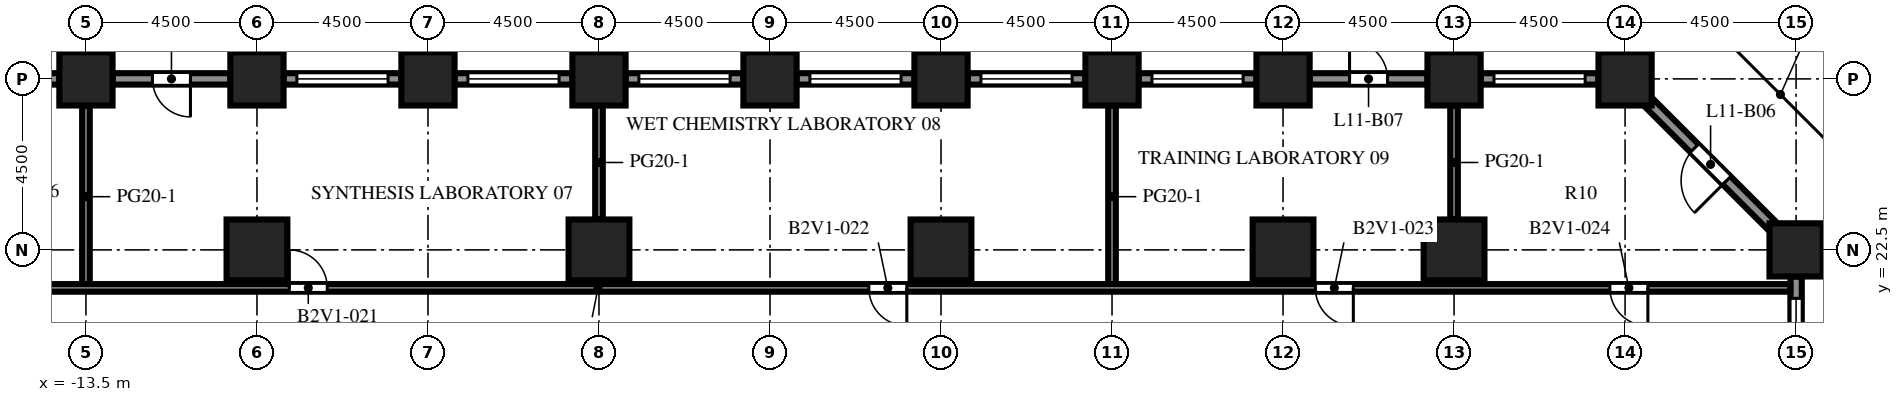
"""IFC4 building model, lengths in metres.
Left out: names, types, materials, properties, quantities, classifications, styles, units other than length and angle.
Written with IfcOpenShell. Run it as: python <this file> out.ifc"""

import sys

from ifc_helpers import new_model, si_unit, direction, frame, frame_2d, origin, origin_2d, place, context, subcontext, project, spatial, rectangle, extrude, element, fill, save


model = new_model("IFC4")
c1 = context("Model", 3, precision=1e-05, world=origin(), true_north=direction((0.0, 1.0)))
c2 = subcontext(c1, "Body", "Model", "MODEL_VIEW")
j1 = project(units=[si_unit("LENGTHUNIT", "METRE"), si_unit("PLANEANGLEUNIT", "RADIAN")], contexts=[c1])
p1 = place(None, origin())
s1 = spatial("IfcSite", under=j1, at=p1, CompositionType="ELEMENT")
p2 = place(p1, origin())
s2 = spatial("IfcBuilding", under=s1, at=p2, CompositionType="ELEMENT")
p3 = place(p2, frame((0.0, 0.0, 50.1)))
s3 = spatial("IfcBuildingStorey", under=s2, at=p3, CompositionType="ELEMENT", Elevation=50.1)
for number, where, z_axis, x_axis in (
    (1, (-13.5, 27.0, 0.0), (0.0, 0.0, 1.0), (1.0, 0.0, 0.0)),
    (2, (-9.0, 27.0, 0.0), (0.0, 0.0, 1.0), (1.0, 0.0, 0.0)),
    (3, (-4.5, 27.0, 0.0), (0.0, 0.0, 1.0), (1.0, 0.0, 0.0)),
    (4, (0.0, 27.0, 0.0), (0.0, 0.0, 1.0), (1.0, 0.0, 0.0)),
    (5, (4.5, 27.0, 0.0), (0.0, 0.0, 1.0), (1.0, 0.0, 0.0)),
    (6, (9.0, 27.0, 0.0), (0.0, 0.0, 1.0), (1.0, 0.0, 0.0)),
    (7, (13.5, 27.0, 0.0), (0.0, 0.0, 1.0), (1.0, 0.0, 0.0)),
    (8, (18.0, 27.0, 0.0), (0.0, 0.0, 1.0), (1.0, 0.0, 0.0)),
    (9, (22.5, 27.0, 0.0), (0.0, 0.0, 1.0), (1.0, 0.0, 0.0)),
    (10, (27.0, 27.0, 0.0), (0.0, 0.0, 1.0), (1.0, 0.0, 0.0)),
    (11, (31.5, 22.5, 0.0), (0.0, 0.0, 1.0), (1.0, 0.0, 0.0)),
):
    element("IfcColumn", number, at=place(p3, frame(where, z_axis=z_axis, x_axis=x_axis)), inside=s3, PredefinedType="COLUMN", context=c2, shape_type="SweptSolid", body=[
        extrude(rectangle(XDim=1.4, YDim=1.4, at=origin_2d()), origin(), (0.0, 0.0, 1.0), 4.1),
    ])
for number, where, z_axis, x_axis in (
    (12, (-9.0, 22.5, 0.0), (0.0, 0.0, 1.0), (1.0, 0.0, 0.0)),
    (13, (0.0, 22.5, 0.0), (0.0, 0.0, 1.0), (1.0, 0.0, 0.0)),
    (14, (9.0, 22.5, 0.0), (0.0, 0.0, 1.0), (1.0, 0.0, 0.0)),
    (15, (18.0, 22.5, 0.0), (0.0, 0.0, 1.0), (1.0, 0.0, 0.0)),
    (16, (22.5, 22.5, 0.0), (0.0, 0.0, 1.0), (1.0, 0.0, 0.0)),
):
    element("IfcColumn", number, at=place(p3, frame(where, z_axis=z_axis, x_axis=x_axis)), inside=s3, PredefinedType="COLUMN", context=c2, shape_type="SweptSolid", body=[
        extrude(rectangle(XDim=1.6, YDim=1.6, at=origin_2d()), origin(), (0.0, 0.0, 1.0), 4.1),
    ])
p4 = place(p3, frame((31.5, 21.8, 0.0), z_axis=(0.0, 0.0, 1.0), x_axis=(0.0, -1.0, 0.0)))
e17 = element("IfcWall", 17, at=p4, inside=s3, PredefinedType="SOLIDWALL", context=c2, shape_type="SweptSolid", body=[
    extrude(rectangle(XDim=3.1, YDim=0.3, at=frame_2d((1.55, 0.0))), origin(), (0.0, 0.0, 1.0), 2.75),
])
p5 = place(p4, frame((0.575, 0.0, 0.8)))
e18 = element("IfcOpeningElement", 18, at=p5, cuts=e17, PredefinedType="OPENING", context=c2, shape_type="SweptSolid", body=[
    extrude(rectangle(XDim=2.4, YDim=1.7, at=frame_2d((1.2, 0.85))), frame((0.0, 0.16, 0.0), z_axis=(0.0, -1.0, 0.0), x_axis=(1.0, 0.0, 0.0)), (0.0, 0.0, 1.0), 0.32),
])
p6 = place(p3, frame((27.594, 26.406, 0.0), z_axis=(0.0, 0.0, 1.0), x_axis=(0.707106781187, -0.707106781187, 0.0)))
e19 = element("IfcWall", 19, at=p6, inside=s3, PredefinedType="SOLIDWALL", context=c2, shape_type="SweptSolid", body=[
    extrude(rectangle(XDim=4.684, YDim=0.3, at=frame_2d((2.342, 0.0))), origin(), (0.0, 0.0, 1.0), 2.75),
])
p7 = place(p6, frame((1.742, 0.0, 0.0)))
e20 = element("IfcOpeningElement", 20, at=p7, cuts=e19, PredefinedType="OPENING", context=c2, shape_type="SweptSolid", body=[
    extrude(rectangle(XDim=1.2, YDim=2.2, at=frame_2d((0.6, 1.1))), frame((0.0, 0.16, 0.0), z_axis=(0.0, -1.0, 0.0), x_axis=(1.0, 0.0, 0.0)), (0.0, 0.0, 1.0), 0.32),
])
p8 = place(p3, frame((23.2, 27.0, 0.0), z_axis=(0.0, 0.0, 1.0), x_axis=(1.0, 0.0, 0.0)))
e21 = element("IfcWall", 21, at=p8, inside=s3, PredefinedType="SOLIDWALL", context=c2, shape_type="SweptSolid", body=[
    extrude(rectangle(XDim=3.1, YDim=0.3, at=frame_2d((1.55, 0.0))), origin(), (0.0, 0.0, 1.0), 2.75),
])
p9 = place(p8, frame((0.35, 0.0, 0.8)))
e22 = element("IfcOpeningElement", 22, at=p9, cuts=e21, PredefinedType="OPENING", context=c2, shape_type="SweptSolid", body=[
    extrude(rectangle(XDim=2.4, YDim=1.7, at=frame_2d((1.2, 0.85))), frame((0.0, 0.16, 0.0), z_axis=(0.0, -1.0, 0.0), x_axis=(1.0, 0.0, 0.0)), (0.0, 0.0, 1.0), 0.32),
])
p10 = place(p3, frame((18.7, 27.0, 0.0), z_axis=(0.0, 0.0, 1.0), x_axis=(1.0, 0.0, 0.0)))
e23 = element("IfcWall", 23, at=p10, inside=s3, PredefinedType="SOLIDWALL", context=c2, shape_type="SweptSolid", body=[
    extrude(rectangle(XDim=3.1, YDim=0.3, at=frame_2d((1.55, 0.0))), origin(), (0.0, 0.0, 1.0), 2.75),
])
p11 = place(p10, frame((1.05, 0.0, 0.0)))
e24 = element("IfcOpeningElement", 24, at=p11, cuts=e23, PredefinedType="OPENING", context=c2, shape_type="SweptSolid", body=[
    extrude(rectangle(XDim=1.0, YDim=2.2, at=frame_2d((0.5, 1.1))), frame((0.0, 0.16, 0.0), z_axis=(0.0, -1.0, 0.0), x_axis=(1.0, 0.0, 0.0)), (0.0, 0.0, 1.0), 0.32),
])
p12 = place(p3, frame((14.2, 27.0, 0.0), z_axis=(0.0, 0.0, 1.0), x_axis=(1.0, 0.0, 0.0)))
e25 = element("IfcWall", 25, at=p12, inside=s3, PredefinedType="SOLIDWALL", context=c2, shape_type="SweptSolid", body=[
    extrude(rectangle(XDim=3.1, YDim=0.3, at=frame_2d((1.55, 0.0))), origin(), (0.0, 0.0, 1.0), 2.75),
])
p13 = place(p12, frame((0.35, 0.0, 0.8)))
e26 = element("IfcOpeningElement", 26, at=p13, cuts=e25, PredefinedType="OPENING", context=c2, shape_type="SweptSolid", body=[
    extrude(rectangle(XDim=2.4, YDim=1.7, at=frame_2d((1.2, 0.85))), frame((0.0, 0.16, 0.0), z_axis=(0.0, -1.0, 0.0), x_axis=(1.0, 0.0, 0.0)), (0.0, 0.0, 1.0), 0.32),
])
p14 = place(p3, frame((9.7, 27.0, 0.0), z_axis=(0.0, 0.0, 1.0), x_axis=(1.0, 0.0, 0.0)))
e27 = element("IfcWall", 27, at=p14, inside=s3, PredefinedType="SOLIDWALL", context=c2, shape_type="SweptSolid", body=[
    extrude(rectangle(XDim=3.1, YDim=0.3, at=frame_2d((1.55, 0.0))), origin(), (0.0, 0.0, 1.0), 2.75),
])
p15 = place(p14, frame((0.35, 0.0, 0.8)))
e28 = element("IfcOpeningElement", 28, at=p15, cuts=e27, PredefinedType="OPENING", context=c2, shape_type="SweptSolid", body=[
    extrude(rectangle(XDim=2.4, YDim=1.7, at=frame_2d((1.2, 0.85))), frame((0.0, 0.16, 0.0), z_axis=(0.0, -1.0, 0.0), x_axis=(1.0, 0.0, 0.0)), (0.0, 0.0, 1.0), 0.32),
])
p16 = place(p3, frame((5.2, 27.0, 0.0), z_axis=(0.0, 0.0, 1.0), x_axis=(1.0, 0.0, 0.0)))
e29 = element("IfcWall", 29, at=p16, inside=s3, PredefinedType="SOLIDWALL", context=c2, shape_type="SweptSolid", body=[
    extrude(rectangle(XDim=3.1, YDim=0.3, at=frame_2d((1.55, 0.0))), origin(), (0.0, 0.0, 1.0), 2.75),
])
p17 = place(p16, frame((0.35, 0.0, 0.8)))
e30 = element("IfcOpeningElement", 30, at=p17, cuts=e29, PredefinedType="OPENING", context=c2, shape_type="SweptSolid", body=[
    extrude(rectangle(XDim=2.4, YDim=1.7, at=frame_2d((1.2, 0.85))), frame((0.0, 0.16, 0.0), z_axis=(0.0, -1.0, 0.0), x_axis=(1.0, 0.0, 0.0)), (0.0, 0.0, 1.0), 0.32),
])
p18 = place(p3, frame((0.7, 27.0, 0.0), z_axis=(0.0, 0.0, 1.0), x_axis=(1.0, 0.0, 0.0)))
e31 = element("IfcWall", 31, at=p18, inside=s3, PredefinedType="SOLIDWALL", context=c2, shape_type="SweptSolid", body=[
    extrude(rectangle(XDim=3.1, YDim=0.3, at=frame_2d((1.55, 0.0))), origin(), (0.0, 0.0, 1.0), 2.75),
])
p19 = place(p18, frame((0.35, 0.0, 0.8)))
e32 = element("IfcOpeningElement", 32, at=p19, cuts=e31, PredefinedType="OPENING", context=c2, shape_type="SweptSolid", body=[
    extrude(rectangle(XDim=2.4, YDim=1.7, at=frame_2d((1.2, 0.85))), frame((0.0, 0.16, 0.0), z_axis=(0.0, -1.0, 0.0), x_axis=(1.0, 0.0, 0.0)), (0.0, 0.0, 1.0), 0.32),
])
p20 = place(p3, frame((-3.8, 27.0, 0.0), z_axis=(0.0, 0.0, 1.0), x_axis=(1.0, 0.0, 0.0)))
e33 = element("IfcWall", 33, at=p20, inside=s3, PredefinedType="SOLIDWALL", context=c2, shape_type="SweptSolid", body=[
    extrude(rectangle(XDim=3.1, YDim=0.3, at=frame_2d((1.55, 0.0))), origin(), (0.0, 0.0, 1.0), 2.75),
])
p21 = place(p20, frame((0.35, 0.0, 0.8)))
e34 = element("IfcOpeningElement", 34, at=p21, cuts=e33, PredefinedType="OPENING", context=c2, shape_type="SweptSolid", body=[
    extrude(rectangle(XDim=2.4, YDim=1.7, at=frame_2d((1.2, 0.85))), frame((0.0, 0.16, 0.0), z_axis=(0.0, -1.0, 0.0), x_axis=(1.0, 0.0, 0.0)), (0.0, 0.0, 1.0), 0.32),
])
p22 = place(p3, frame((-8.3, 27.0, 0.0), z_axis=(0.0, 0.0, 1.0), x_axis=(1.0, 0.0, 0.0)))
e35 = element("IfcWall", 35, at=p22, inside=s3, PredefinedType="SOLIDWALL", context=c2, shape_type="SweptSolid", body=[
    extrude(rectangle(XDim=3.1, YDim=0.3, at=frame_2d((1.55, 0.0))), origin(), (0.0, 0.0, 1.0), 2.75),
])
p23 = place(p22, frame((0.35, 0.0, 0.8)))
e36 = element("IfcOpeningElement", 36, at=p23, cuts=e35, PredefinedType="OPENING", context=c2, shape_type="SweptSolid", body=[
    extrude(rectangle(XDim=2.4, YDim=1.7, at=frame_2d((1.2, 0.85))), frame((0.0, 0.16, 0.0), z_axis=(0.0, -1.0, 0.0), x_axis=(1.0, 0.0, 0.0)), (0.0, 0.0, 1.0), 0.32),
])
p24 = place(p3, frame((-12.8, 27.0, 0.0), z_axis=(0.0, 0.0, 1.0), x_axis=(1.0, 0.0, 0.0)))
e37 = element("IfcWall", 37, at=p24, inside=s3, PredefinedType="SOLIDWALL", context=c2, shape_type="SweptSolid", body=[
    extrude(rectangle(XDim=3.1, YDim=0.3, at=frame_2d((1.55, 0.0))), origin(), (0.0, 0.0, 1.0), 2.75),
])
p25 = place(p24, frame((1.05, 0.0, 0.0)))
e38 = element("IfcOpeningElement", 38, at=p25, cuts=e37, PredefinedType="OPENING", context=c2, shape_type="SweptSolid", body=[
    extrude(rectangle(XDim=1.0, YDim=2.2, at=frame_2d((0.5, 1.1))), frame((0.0, 0.16, 0.0), z_axis=(0.0, -1.0, 0.0), x_axis=(1.0, 0.0, 0.0)), (0.0, 0.0, 1.0), 0.32),
])
p26 = place(p3, frame((-17.3, 27.0, 0.0), z_axis=(0.0, 0.0, 1.0), x_axis=(1.0, 0.0, 0.0)))
e39 = element("IfcWall", 39, at=p26, inside=s3, PredefinedType="SOLIDWALL", context=c2, shape_type="SweptSolid", body=[
    extrude(rectangle(XDim=3.1, YDim=0.3, at=frame_2d((1.55, 0.0))), origin(), (0.0, 0.0, 1.0), 2.75),
])
p27 = place(p26, frame((0.35, 0.0, 0.8)))
e40 = element("IfcOpeningElement", 40, at=p27, cuts=e39, PredefinedType="OPENING", context=c2, shape_type="SweptSolid", body=[
    extrude(rectangle(XDim=2.4, YDim=1.7, at=frame_2d((1.2, 0.85))), frame((0.0, 0.16, 0.0), z_axis=(0.0, -1.0, 0.0), x_axis=(1.0, 0.0, 0.0)), (0.0, 0.0, 1.0), 0.32),
])
p28 = place(p3, frame((-13.5, 21.5, 0.0), z_axis=(0.0, 0.0, 1.0), x_axis=(0.0, 1.0, 0.0)))
e41 = element("IfcWall", 41, at=p28, inside=s3, PredefinedType="PARTITIONING", context=c2, shape_type="SweptSolid", body=[
    extrude(rectangle(XDim=4.8, YDim=0.2, at=frame_2d((2.4, 0.0))), origin(), (0.0, 0.0, 1.0), 3.65),
])
p29 = place(p3, frame((0.0, 23.3, 0.0), z_axis=(0.0, 0.0, 1.0), x_axis=(0.0, 1.0, 0.0)))
e42 = element("IfcWall", 42, at=p29, inside=s3, PredefinedType="PARTITIONING", context=c2, shape_type="SweptSolid", body=[
    extrude(rectangle(XDim=3.0, YDim=0.2, at=frame_2d((1.5, 0.0))), origin(), (0.0, 0.0, 1.0), 3.65),
])
p30 = place(p3, frame((13.5, 21.5, 0.0), z_axis=(0.0, 0.0, 1.0), x_axis=(0.0, 1.0, 0.0)))
e43 = element("IfcWall", 43, at=p30, inside=s3, PredefinedType="PARTITIONING", context=c2, shape_type="SweptSolid", body=[
    extrude(rectangle(XDim=4.8, YDim=0.2, at=frame_2d((2.4, 0.0))), origin(), (0.0, 0.0, 1.0), 3.65),
])
p31 = place(p3, frame((22.5, 23.3, 0.0), z_axis=(0.0, 0.0, 1.0), x_axis=(0.0, 1.0, 0.0)))
e44 = element("IfcWall", 44, at=p31, inside=s3, PredefinedType="PARTITIONING", context=c2, shape_type="SweptSolid", body=[
    extrude(rectangle(XDim=3.0, YDim=0.2, at=frame_2d((1.5, 0.0))), origin(), (0.0, 0.0, 1.0), 3.65),
])
p32 = place(p3, frame((-22.35, 21.5, 0.0), z_axis=(0.0, 0.0, 1.0), x_axis=(1.0, 0.0, 0.0)))
e45 = element("IfcWall", 45, at=p32, inside=s3, PredefinedType="PARTITIONING", context=c2, shape_type="SweptSolid", body=[
    extrude(rectangle(XDim=53.7, YDim=0.2, at=frame_2d((26.85, 0.0))), origin(), (0.0, 0.0, 1.0), 3.65),
])
p33 = place(p32, frame((3.7, 0.0, 0.0)))
e46 = element("IfcOpeningElement", 46, at=p33, cuts=e45, PredefinedType="OPENING", context=c2, shape_type="SweptSolid", body=[
    extrude(rectangle(XDim=1.0, YDim=2.1, at=frame_2d((0.5, 1.05))), frame((0.0, 0.11, 0.0), z_axis=(0.0, -1.0, 0.0), x_axis=(1.0, 0.0, 0.0)), (0.0, 0.0, 1.0), 0.22),
])
p34 = place(p32, frame((14.2, 0.0, 0.0)))
e47 = element("IfcOpeningElement", 47, at=p34, cuts=e45, PredefinedType="OPENING", context=c2, shape_type="SweptSolid", body=[
    extrude(rectangle(XDim=1.0, YDim=2.1, at=frame_2d((0.5, 1.05))), frame((0.0, 0.11, 0.0), z_axis=(0.0, -1.0, 0.0), x_axis=(1.0, 0.0, 0.0)), (0.0, 0.0, 1.0), 0.22),
])
p35 = place(p32, frame((29.45, 0.0, 0.0)))
e48 = element("IfcOpeningElement", 48, at=p35, cuts=e45, PredefinedType="OPENING", context=c2, shape_type="SweptSolid", body=[
    extrude(rectangle(XDim=1.0, YDim=2.1, at=frame_2d((0.5, 1.05))), frame((0.0, 0.11, 0.0), z_axis=(0.0, -1.0, 0.0), x_axis=(1.0, 0.0, 0.0)), (0.0, 0.0, 1.0), 0.22),
])
p36 = place(p32, frame((41.2, 0.0, 0.0)))
e49 = element("IfcOpeningElement", 49, at=p36, cuts=e45, PredefinedType="OPENING", context=c2, shape_type="SweptSolid", body=[
    extrude(rectangle(XDim=1.0, YDim=2.1, at=frame_2d((0.5, 1.05))), frame((0.0, 0.11, 0.0), z_axis=(0.0, -1.0, 0.0), x_axis=(1.0, 0.0, 0.0)), (0.0, 0.0, 1.0), 0.22),
])
p37 = place(p32, frame((48.95, 0.0, 0.0)))
e50 = element("IfcOpeningElement", 50, at=p37, cuts=e45, PredefinedType="OPENING", context=c2, shape_type="SweptSolid", body=[
    extrude(rectangle(XDim=1.0, YDim=2.1, at=frame_2d((0.5, 1.05))), frame((0.0, 0.11, 0.0), z_axis=(0.0, -1.0, 0.0), x_axis=(1.0, 0.0, 0.0)), (0.0, 0.0, 1.0), 0.22),
])
p38 = place(p5, origin())
e51 = element("IfcWindow", 51, at=p38, inside=s3, PartitioningType="SINGLE_PANEL", PredefinedType="WINDOW", context=c2, shape_type="SweptSolid", body=[
    extrude(rectangle(XDim=2.4, YDim=1.7, at=frame_2d((1.2, 0.85))), frame((0.0, 0.03, 0.0), z_axis=(0.0, -1.0, 0.0), x_axis=(1.0, 0.0, 0.0)), (0.0, 0.0, 1.0), 0.06),
])
fill(e18, e51)
p39 = place(p7, origin())
e52 = element("IfcDoor", 52, at=p39, inside=s3, OperationType="SINGLE_SWING_RIGHT", PredefinedType="DOOR", context=c2, shape_type="SweptSolid", body=[
    extrude(rectangle(XDim=1.2, YDim=2.2, at=frame_2d((0.6, 1.1))), frame((0.0, 0.025, 0.0), z_axis=(0.0, -1.0, 0.0), x_axis=(1.0, 0.0, 0.0)), (0.0, 0.0, 1.0), 0.05),
])
fill(e20, e52)
p40 = place(p9, origin())
e53 = element("IfcWindow", 53, at=p40, inside=s3, PartitioningType="SINGLE_PANEL", PredefinedType="WINDOW", context=c2, shape_type="SweptSolid", body=[
    extrude(rectangle(XDim=2.4, YDim=1.7, at=frame_2d((1.2, 0.85))), frame((0.0, 0.03, 0.0), z_axis=(0.0, -1.0, 0.0), x_axis=(1.0, 0.0, 0.0)), (0.0, 0.0, 1.0), 0.06),
])
fill(e22, e53)
p41 = place(p11, origin())
e54 = element("IfcDoor", 54, at=p41, inside=s3, OperationType="SINGLE_SWING_LEFT", PredefinedType="DOOR", context=c2, shape_type="SweptSolid", body=[
    extrude(rectangle(XDim=1.0, YDim=2.2, at=frame_2d((0.5, 1.1))), frame((0.0, 0.025, 0.0), z_axis=(0.0, -1.0, 0.0), x_axis=(1.0, 0.0, 0.0)), (0.0, 0.0, 1.0), 0.05),
])
fill(e24, e54)
p42 = place(p13, origin())
e55 = element("IfcWindow", 55, at=p42, inside=s3, PartitioningType="SINGLE_PANEL", PredefinedType="WINDOW", context=c2, shape_type="SweptSolid", body=[
    extrude(rectangle(XDim=2.4, YDim=1.7, at=frame_2d((1.2, 0.85))), frame((0.0, 0.03, 0.0), z_axis=(0.0, -1.0, 0.0), x_axis=(1.0, 0.0, 0.0)), (0.0, 0.0, 1.0), 0.06),
])
fill(e26, e55)
p43 = place(p15, origin())
e56 = element("IfcWindow", 56, at=p43, inside=s3, PartitioningType="SINGLE_PANEL", PredefinedType="WINDOW", context=c2, shape_type="SweptSolid", body=[
    extrude(rectangle(XDim=2.4, YDim=1.7, at=frame_2d((1.2, 0.85))), frame((0.0, 0.03, 0.0), z_axis=(0.0, -1.0, 0.0), x_axis=(1.0, 0.0, 0.0)), (0.0, 0.0, 1.0), 0.06),
])
fill(e28, e56)
p44 = place(p17, origin())
e57 = element("IfcWindow", 57, at=p44, inside=s3, PartitioningType="SINGLE_PANEL", PredefinedType="WINDOW", context=c2, shape_type="SweptSolid", body=[
    extrude(rectangle(XDim=2.4, YDim=1.7, at=frame_2d((1.2, 0.85))), frame((0.0, 0.03, 0.0), z_axis=(0.0, -1.0, 0.0), x_axis=(1.0, 0.0, 0.0)), (0.0, 0.0, 1.0), 0.06),
])
fill(e30, e57)
p45 = place(p19, origin())
e58 = element("IfcWindow", 58, at=p45, inside=s3, PartitioningType="SINGLE_PANEL", PredefinedType="WINDOW", context=c2, shape_type="SweptSolid", body=[
    extrude(rectangle(XDim=2.4, YDim=1.7, at=frame_2d((1.2, 0.85))), frame((0.0, 0.03, 0.0), z_axis=(0.0, -1.0, 0.0), x_axis=(1.0, 0.0, 0.0)), (0.0, 0.0, 1.0), 0.06),
])
fill(e32, e58)
p46 = place(p21, origin())
e59 = element("IfcWindow", 59, at=p46, inside=s3, PartitioningType="SINGLE_PANEL", PredefinedType="WINDOW", context=c2, shape_type="SweptSolid", body=[
    extrude(rectangle(XDim=2.4, YDim=1.7, at=frame_2d((1.2, 0.85))), frame((0.0, 0.03, 0.0), z_axis=(0.0, -1.0, 0.0), x_axis=(1.0, 0.0, 0.0)), (0.0, 0.0, 1.0), 0.06),
])
fill(e34, e59)
p47 = place(p23, origin())
e60 = element("IfcWindow", 60, at=p47, inside=s3, PartitioningType="SINGLE_PANEL", PredefinedType="WINDOW", context=c2, shape_type="SweptSolid", body=[
    extrude(rectangle(XDim=2.4, YDim=1.7, at=frame_2d((1.2, 0.85))), frame((0.0, 0.03, 0.0), z_axis=(0.0, -1.0, 0.0), x_axis=(1.0, 0.0, 0.0)), (0.0, 0.0, 1.0), 0.06),
])
fill(e36, e60)
p48 = place(p25, origin())
e61 = element("IfcDoor", 61, at=p48, inside=s3, OperationType="SINGLE_SWING_RIGHT", PredefinedType="DOOR", context=c2, shape_type="SweptSolid", body=[
    extrude(rectangle(XDim=1.0, YDim=2.2, at=frame_2d((0.5, 1.1))), frame((0.0, 0.025, 0.0), z_axis=(0.0, -1.0, 0.0), x_axis=(1.0, 0.0, 0.0)), (0.0, 0.0, 1.0), 0.05),
])
fill(e38, e61)
p49 = place(p34, origin())
e62 = element("IfcDoor", 62, at=p49, inside=s3, OperationType="SINGLE_SWING_LEFT", PredefinedType="DOOR", context=c2, shape_type="SweptSolid", body=[
    extrude(rectangle(XDim=1.0, YDim=2.1, at=frame_2d((0.5, 1.05))), frame((0.0, 0.025, 0.0), z_axis=(0.0, -1.0, 0.0), x_axis=(1.0, 0.0, 0.0)), (0.0, 0.0, 1.0), 0.05),
])
fill(e47, e62)
p50 = place(p35, origin())
e63 = element("IfcDoor", 63, at=p50, inside=s3, OperationType="SINGLE_SWING_RIGHT", PredefinedType="DOOR", context=c2, shape_type="SweptSolid", body=[
    extrude(rectangle(XDim=1.0, YDim=2.1, at=frame_2d((0.5, 1.05))), frame((0.0, 0.025, 0.0), z_axis=(0.0, -1.0, 0.0), x_axis=(1.0, 0.0, 0.0)), (0.0, 0.0, 1.0), 0.05),
])
fill(e48, e63)
p51 = place(p36, origin())
e64 = element("IfcDoor", 64, at=p51, inside=s3, OperationType="SINGLE_SWING_RIGHT", PredefinedType="DOOR", context=c2, shape_type="SweptSolid", body=[
    extrude(rectangle(XDim=1.0, YDim=2.1, at=frame_2d((0.5, 1.05))), frame((0.0, 0.025, 0.0), z_axis=(0.0, -1.0, 0.0), x_axis=(1.0, 0.0, 0.0)), (0.0, 0.0, 1.0), 0.05),
])
fill(e49, e64)
p52 = place(p37, origin())
e65 = element("IfcDoor", 65, at=p52, inside=s3, OperationType="SINGLE_SWING_RIGHT", PredefinedType="DOOR", context=c2, shape_type="SweptSolid", body=[
    extrude(rectangle(XDim=1.0, YDim=2.1, at=frame_2d((0.5, 1.05))), frame((0.0, 0.025, 0.0), z_axis=(0.0, -1.0, 0.0), x_axis=(1.0, 0.0, 0.0)), (0.0, 0.0, 1.0), 0.05),
])
fill(e50, e65)
save(model, sys.argv[1])
